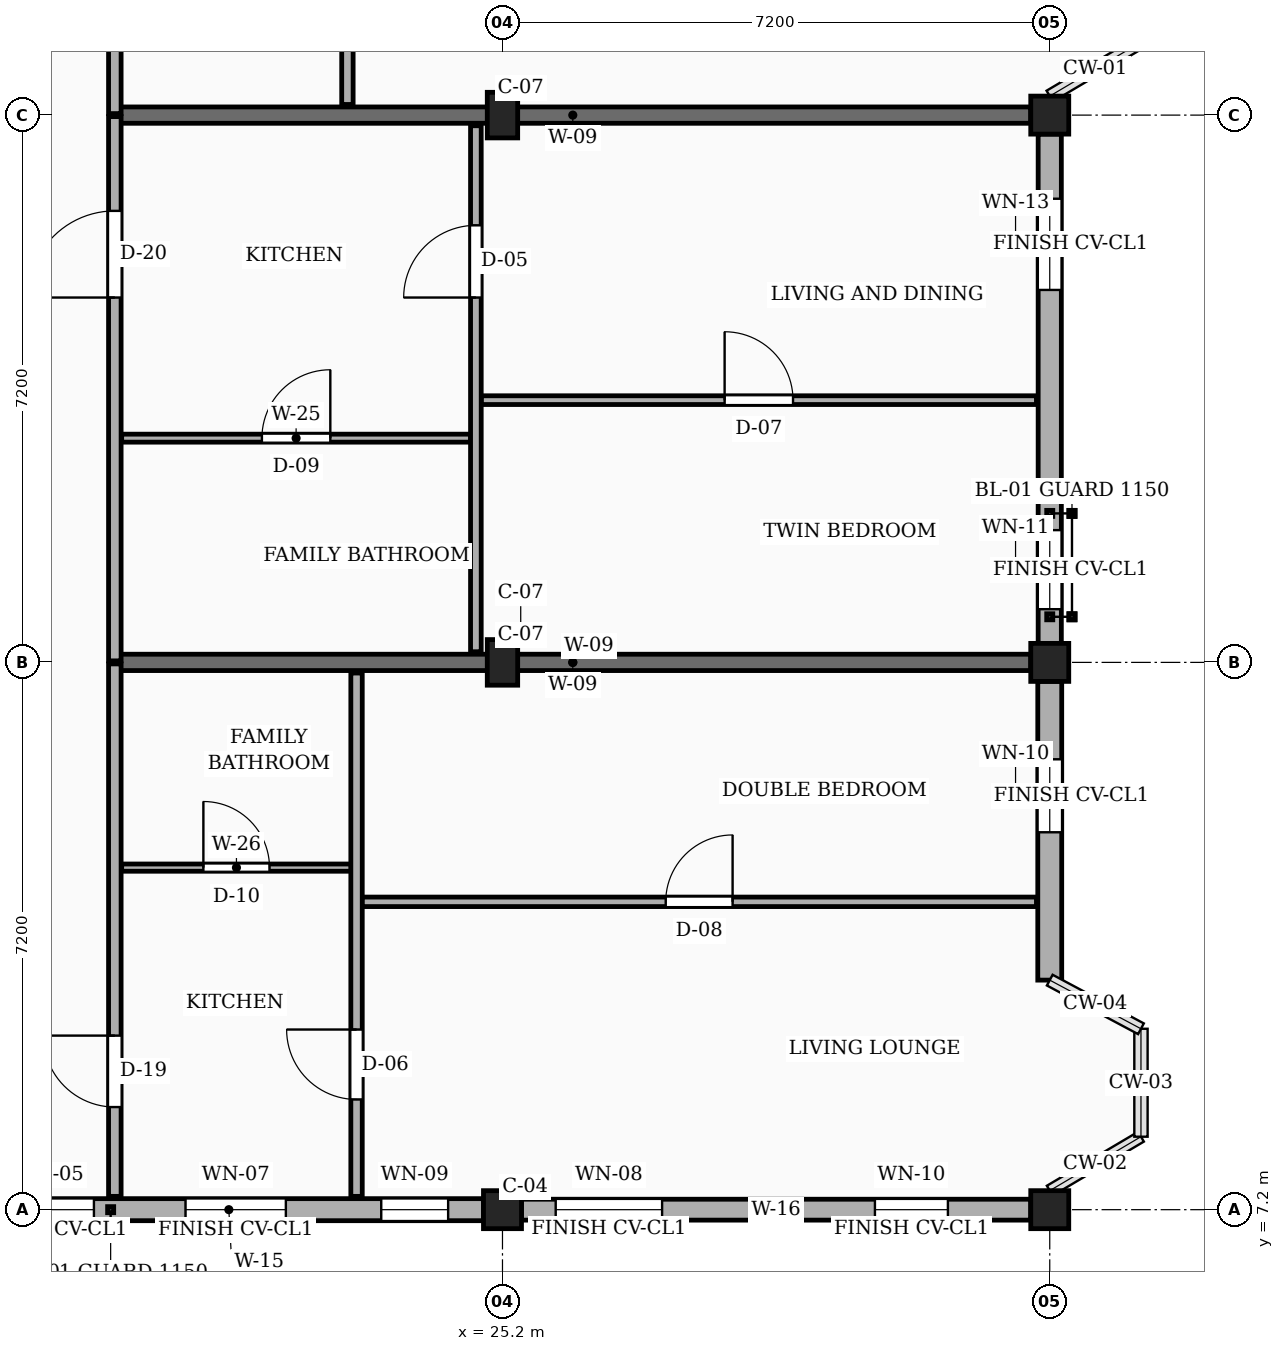
"""IFC4 building model, lengths in metres.
Left out: names, types, materials, properties, quantities, classifications, styles, units other than length and angle.
Written with IfcOpenShell. Run it as: python <this file> out.ifc"""

import sys

from ifc_helpers import new_model, si_unit, direction, frame, frame_2d, origin, origin_2d, place, context, subcontext, project, spatial, rectangle, extrude, element, fill, save


model = new_model("IFC4")
c1 = context("Model", 3, precision=1e-05, world=origin(), true_north=direction((0.0, 1.0)))
c2 = subcontext(c1, "Body", "Model", "MODEL_VIEW")
j1 = project(units=[si_unit("LENGTHUNIT", "METRE"), si_unit("PLANEANGLEUNIT", "RADIAN")], contexts=[c1])
p1 = place(None, origin())
s1 = spatial("IfcSite", under=j1, at=p1, CompositionType="ELEMENT")
p2 = place(p1, origin())
s2 = spatial("IfcBuilding", under=s1, at=p2, CompositionType="ELEMENT")
p3 = place(p2, frame((0.0, 0.0, 26.55)))
s3 = spatial("IfcBuildingStorey", under=s2, at=p3, CompositionType="ELEMENT", Elevation=26.55)
p4 = place(p3, frame((25.2, 7.2, 0.0), z_axis=(0.0, 0.0, 1.0), x_axis=(1.0, 0.0, 0.0)))
e1 = element("IfcColumn", 1, at=p4, inside=s3, PredefinedType="COLUMN", context=c2, shape_type="SweptSolid", body=[
    extrude(rectangle(XDim=0.5, YDim=0.5, at=origin_2d()), origin(), (0.0, 0.0, 1.0), 3.15),
])
for number, where, z_axis, x_axis in (
    (2, (25.2, 14.4, 0.0), (0.0, 0.0, 1.0), (1.0, 0.0, 0.0)),
    (3, (25.2, 21.6, 0.0), (0.0, 0.0, 1.0), (1.0, 0.0, 0.0)),
):
    element("IfcColumn", number, at=place(p3, frame(where, z_axis=z_axis, x_axis=x_axis)), inside=s3, PredefinedType="COLUMN", context=c2, shape_type="SweptSolid", body=[
        extrude(rectangle(XDim=0.4, YDim=0.6, at=origin_2d()), origin(), (0.0, 0.0, 1.0), 3.15),
    ])
for number, where, z_axis, x_axis in (
    (4, (32.4, 7.2, 0.0), (0.0, 0.0, 1.0), (1.0, 0.0, 0.0)),
    (5, (32.4, 14.4, 0.0), (0.0, 0.0, 1.0), (1.0, 0.0, 0.0)),
    (6, (32.4, 21.6, 0.0), (0.0, 0.0, 1.0), (1.0, 0.0, 0.0)),
):
    element("IfcColumn", number, at=place(p3, frame(where, z_axis=z_axis, x_axis=x_axis)), inside=s3, PredefinedType="COLUMN", context=c2, shape_type="SweptSolid", body=[
        extrude(rectangle(XDim=0.5, YDim=0.5, at=origin_2d()), origin(), (0.0, 0.0, 1.0), 3.15),
    ])
for number, where, z_axis, x_axis in (
    (7, (20.1, 14.4, 0.0), (0.0, 0.0, 1.0), (1.0, 0.0, 0.0)),
    (8, (20.1, 21.6, 0.0), (0.0, 0.0, 1.0), (1.0, 0.0, 0.0)),
):
    element("IfcWall", number, at=place(p3, frame(where, z_axis=z_axis, x_axis=x_axis)), inside=s3, PredefinedType="SOLIDWALL", context=c2, shape_type="SweptSolid", body=[
        extrude(rectangle(XDim=12.05, YDim=0.215, at=frame_2d((6.025, 0.0))), origin(), (0.0, 0.0, 1.0), 2.17),
    ])
p5 = place(p3, frame((18.25, 7.2, 0.0), z_axis=(0.0, 0.0, 1.0), x_axis=(1.0, 0.0, 0.0)))
e9 = element("IfcWall", 9, at=p5, inside=s3, PredefinedType="SOLIDWALL", context=c2, shape_type="SweptSolid", body=[
    extrude(rectangle(XDim=6.7, YDim=0.29, at=frame_2d((3.35, 0.0))), origin(), (0.0, 0.0, 1.0), 2.44),
])
p6 = place(p5, frame((0.415, 0.0, 0.78)))
e10 = element("IfcOpeningElement", 10, at=p6, cuts=e9, PredefinedType="OPENING", context=c2, shape_type="SweptSolid", body=[
    extrude(rectangle(XDim=1.16, YDim=1.15, at=frame_2d((0.58, 0.575))), frame((0.0, 0.155, 0.0), z_axis=(0.0, -1.0, 0.0), x_axis=(1.0, 0.0, 0.0)), (0.0, 0.0, 1.0), 0.31),
])
p7 = place(p5, frame((2.78, 0.0, 0.78)))
e11 = element("IfcOpeningElement", 11, at=p7, cuts=e9, PredefinedType="OPENING", context=c2, shape_type="SweptSolid", body=[
    extrude(rectangle(XDim=1.32, YDim=1.15, at=frame_2d((0.66, 0.575))), frame((0.0, 0.155, 0.0), z_axis=(0.0, -1.0, 0.0), x_axis=(1.0, 0.0, 0.0)), (0.0, 0.0, 1.0), 0.31),
])
p8 = place(p5, frame((5.355, 0.0, 0.78)))
e12 = element("IfcOpeningElement", 12, at=p8, cuts=e9, PredefinedType="OPENING", context=c2, shape_type="SweptSolid", body=[
    extrude(rectangle(XDim=0.88, YDim=1.26, at=frame_2d((0.44, 0.63))), frame((0.0, 0.155, 0.0), z_axis=(0.0, -1.0, 0.0), x_axis=(1.0, 0.0, 0.0)), (0.0, 0.0, 1.0), 0.31),
])
p9 = place(p3, frame((25.45, 7.2, 0.0), z_axis=(0.0, 0.0, 1.0), x_axis=(1.0, 0.0, 0.0)))
e13 = element("IfcWall", 13, at=p9, inside=s3, PredefinedType="SOLIDWALL", context=c2, shape_type="SweptSolid", body=[
    extrude(rectangle(XDim=6.7, YDim=0.275, at=frame_2d((3.35, 0.0))), origin(), (0.0, 0.0, 1.0), 2.44),
])
p10 = place(p9, frame((0.45, 0.0, 0.78)))
e14 = element("IfcOpeningElement", 14, at=p10, cuts=e13, PredefinedType="OPENING", context=c2, shape_type="SweptSolid", body=[
    extrude(rectangle(XDim=1.4, YDim=1.15, at=frame_2d((0.7, 0.575))), frame((0.0, 0.147, 0.0), z_axis=(0.0, -1.0, 0.0), x_axis=(1.0, 0.0, 0.0)), (0.0, 0.0, 1.0), 0.295),
])
p11 = place(p9, frame((4.65, 0.0, 0.78)))
e15 = element("IfcOpeningElement", 15, at=p11, cuts=e13, PredefinedType="OPENING", context=c2, shape_type="SweptSolid", body=[
    extrude(rectangle(XDim=0.96, YDim=1.26, at=frame_2d((0.48, 0.63))), frame((0.0, 0.147, 0.0), z_axis=(0.0, -1.0, 0.0), x_axis=(1.0, 0.0, 0.0)), (0.0, 0.0, 1.0), 0.295),
])
p12 = place(p3, frame((32.4, 10.22, 0.0), z_axis=(0.0, 0.0, 1.0), x_axis=(0.0, 1.0, 0.0)))
e16 = element("IfcWall", 16, at=p12, inside=s3, PredefinedType="SOLIDWALL", context=c2, shape_type="SweptSolid", body=[
    extrude(rectangle(XDim=3.93, YDim=0.315, at=frame_2d((1.965, 0.0))), origin(), (0.0, 0.0, 1.0), 2.44),
])
p13 = place(p12, frame((1.945, 0.0, 0.78)))
e17 = element("IfcOpeningElement", 17, at=p13, cuts=e16, PredefinedType="OPENING", context=c2, shape_type="SweptSolid", body=[
    extrude(rectangle(XDim=0.96, YDim=1.26, at=frame_2d((0.48, 0.63))), frame((0.0, 0.167, 0.0), z_axis=(0.0, -1.0, 0.0), x_axis=(1.0, 0.0, 0.0)), (0.0, 0.0, 1.0), 0.335),
])
p14 = place(p3, frame((32.4, 14.65, 0.0), z_axis=(0.0, 0.0, 1.0), x_axis=(0.0, 1.0, 0.0)))
e18 = element("IfcWall", 18, at=p14, inside=s3, PredefinedType="SOLIDWALL", context=c2, shape_type="SweptSolid", body=[
    extrude(rectangle(XDim=6.7, YDim=0.305, at=frame_2d((3.35, 0.0))), origin(), (0.0, 0.0, 1.0), 2.44),
])
p15 = place(p14, frame((0.45, 0.0, 0.78)))
e19 = element("IfcOpeningElement", 19, at=p15, cuts=e18, PredefinedType="OPENING", context=c2, shape_type="SweptSolid", body=[
    extrude(rectangle(XDim=1.04, YDim=1.26, at=frame_2d((0.52, 0.63))), frame((0.0, 0.163, 0.0), z_axis=(0.0, -1.0, 0.0), x_axis=(1.0, 0.0, 0.0)), (0.0, 0.0, 1.0), 0.325),
])
p16 = place(p14, frame((4.65, 0.0, 0.78)))
e20 = element("IfcOpeningElement", 20, at=p16, cuts=e18, PredefinedType="OPENING", context=c2, shape_type="SweptSolid", body=[
    extrude(rectangle(XDim=1.2, YDim=1.26, at=frame_2d((0.6, 0.63))), frame((0.0, 0.163, 0.0), z_axis=(0.0, -1.0, 0.0), x_axis=(1.0, 0.0, 0.0)), (0.0, 0.0, 1.0), 0.325),
])
p17 = place(p3, frame((20.1, 7.375, 0.0), z_axis=(0.0, 0.0, 1.0), x_axis=(0.0, 1.0, 0.0)))
e21 = element("IfcWall", 21, at=p17, inside=s3, PredefinedType="PARTITIONING", context=c2, shape_type="SweptSolid", body=[
    extrude(rectangle(XDim=7.005, YDim=0.165, at=frame_2d((3.502, 0.0))), origin(), (0.0, 0.0, 1.0), 2.305),
])
p18 = place(p17, frame((1.175, 0.0, 0.0)))
e22 = element("IfcOpeningElement", 22, at=p18, cuts=e21, PredefinedType="OPENING", context=c2, shape_type="SweptSolid", body=[
    extrude(rectangle(XDim=0.94, YDim=2.12, at=frame_2d((0.47, 1.06))), frame((0.0, 0.093, 0.0), z_axis=(0.0, -1.0, 0.0), x_axis=(1.0, 0.0, 0.0)), (0.0, 0.0, 1.0), 0.185),
])
p19 = place(p3, frame((20.1, 14.42, 0.0), z_axis=(0.0, 0.0, 1.0), x_axis=(0.0, 1.0, 0.0)))
e23 = element("IfcWall", 23, at=p19, inside=s3, PredefinedType="PARTITIONING", context=c2, shape_type="SweptSolid", body=[
    extrude(rectangle(XDim=7.16, YDim=0.165, at=frame_2d((3.58, 0.0))), origin(), (0.0, 0.0, 1.0), 2.305),
])
p20 = place(p19, frame((4.78, 0.0, 0.0)))
e24 = element("IfcOpeningElement", 24, at=p20, cuts=e23, PredefinedType="OPENING", context=c2, shape_type="SweptSolid", body=[
    extrude(rectangle(XDim=1.14, YDim=2.18, at=frame_2d((0.57, 1.09))), frame((0.0, 0.093, 0.0), z_axis=(0.0, -1.0, 0.0), x_axis=(1.0, 0.0, 0.0)), (0.0, 0.0, 1.0), 0.185),
])
p21 = place(p3, frame((20.1, 21.62, 0.0), z_axis=(0.0, 0.0, 1.0), x_axis=(0.0, 1.0, 0.0)))
e25 = element("IfcWall", 25, at=p21, inside=s3, PredefinedType="PARTITIONING", context=c2, shape_type="SweptSolid", body=[
    extrude(rectangle(XDim=7.16, YDim=0.165, at=frame_2d((3.58, 0.0))), origin(), (0.0, 0.0, 1.0), 2.305),
])
p22 = place(p21, frame((1.33, 0.0, 0.0)))
e26 = element("IfcOpeningElement", 26, at=p22, cuts=e25, PredefinedType="OPENING", context=c2, shape_type="SweptSolid", body=[
    extrude(rectangle(XDim=1.0, YDim=2.15, at=frame_2d((0.5, 1.075))), frame((0.0, 0.093, 0.0), z_axis=(0.0, -1.0, 0.0), x_axis=(1.0, 0.0, 0.0)), (0.0, 0.0, 1.0), 0.185),
])
p23 = place(p3, frame((23.35, 11.25, 0.0), z_axis=(0.0, 0.0, 1.0), x_axis=(1.0, 0.0, 0.0)))
e27 = element("IfcWall", 27, at=p23, inside=s3, PredefinedType="PARTITIONING", context=c2, shape_type="SweptSolid", body=[
    extrude(rectangle(XDim=8.875, YDim=0.125, at=frame_2d((4.438, 0.0))), origin(), (0.0, 0.0, 1.0), 2.305),
])
p24 = place(p23, frame((3.998, 0.0, 0.0)))
e28 = element("IfcOpeningElement", 28, at=p24, cuts=e27, PredefinedType="OPENING", context=c2, shape_type="SweptSolid", body=[
    extrude(rectangle(XDim=0.88, YDim=2.08, at=frame_2d((0.44, 1.04))), frame((0.0, 0.073, 0.0), z_axis=(0.0, -1.0, 0.0), x_axis=(1.0, 0.0, 0.0)), (0.0, 0.0, 1.0), 0.145),
])
p25 = place(p3, frame((20.19, 11.7, 0.0), z_axis=(0.0, 0.0, 1.0), x_axis=(1.0, 0.0, 0.0)))
e29 = element("IfcWall", 29, at=p25, inside=s3, PredefinedType="PARTITIONING", context=c2, shape_type="SweptSolid", body=[
    extrude(rectangle(XDim=3.02, YDim=0.095, at=frame_2d((1.51, 0.0))), origin(), (0.0, 0.0, 1.0), 2.305),
])
p26 = place(p25, frame((1.075, 0.0, 0.0)))
e30 = element("IfcOpeningElement", 30, at=p26, cuts=e29, PredefinedType="OPENING", context=c2, shape_type="SweptSolid", body=[
    extrude(rectangle(XDim=0.87, YDim=2.05, at=frame_2d((0.435, 1.025))), frame((0.0, 0.058, 0.0), z_axis=(0.0, -1.0, 0.0), x_axis=(1.0, 0.0, 0.0)), (0.0, 0.0, 1.0), 0.115),
])
p27 = place(p3, frame((23.28, 7.375, 0.0), z_axis=(0.0, 0.0, 1.0), x_axis=(0.0, 1.0, 0.0)))
e31 = element("IfcWall", 31, at=p27, inside=s3, PredefinedType="PARTITIONING", context=c2, shape_type="SweptSolid", body=[
    extrude(rectangle(XDim=6.885, YDim=0.15, at=frame_2d((3.442, 0.0))), origin(), (0.0, 0.0, 1.0), 2.305),
])
p28 = place(p27, frame((1.275, 0.0, 0.0)))
e32 = element("IfcOpeningElement", 32, at=p28, cuts=e31, PredefinedType="OPENING", context=c2, shape_type="SweptSolid", body=[
    extrude(rectangle(XDim=0.92, YDim=2.1, at=frame_2d((0.46, 1.05))), frame((0.0, 0.085, 0.0), z_axis=(0.0, -1.0, 0.0), x_axis=(1.0, 0.0, 0.0)), (0.0, 0.0, 1.0), 0.17),
])
p29 = place(p3, frame((24.92, 17.85, 0.0), z_axis=(0.0, 0.0, 1.0), x_axis=(1.0, 0.0, 0.0)))
e33 = element("IfcWall", 33, at=p29, inside=s3, PredefinedType="PARTITIONING", context=c2, shape_type="SweptSolid", body=[
    extrude(rectangle(XDim=7.305, YDim=0.115, at=frame_2d((3.653, 0.0))), origin(), (0.0, 0.0, 1.0), 2.305),
])
p30 = place(p29, frame((3.202, 0.0, 0.0)))
e34 = element("IfcOpeningElement", 34, at=p30, cuts=e33, PredefinedType="OPENING", context=c2, shape_type="SweptSolid", body=[
    extrude(rectangle(XDim=0.9, YDim=2.1, at=frame_2d((0.45, 1.05))), frame((0.0, 0.067, 0.0), z_axis=(0.0, -1.0, 0.0), x_axis=(1.0, 0.0, 0.0)), (0.0, 0.0, 1.0), 0.135),
])
p31 = place(p3, frame((20.19, 17.35, 0.0), z_axis=(0.0, 0.0, 1.0), x_axis=(1.0, 0.0, 0.0)))
e35 = element("IfcWall", 35, at=p31, inside=s3, PredefinedType="PARTITIONING", context=c2, shape_type="SweptSolid", body=[
    extrude(rectangle(XDim=4.59, YDim=0.105, at=frame_2d((2.295, 0.0))), origin(), (0.0, 0.0, 1.0), 2.305),
])
p32 = place(p31, frame((1.845, 0.0, 0.0)))
e36 = element("IfcOpeningElement", 36, at=p32, cuts=e35, PredefinedType="OPENING", context=c2, shape_type="SweptSolid", body=[
    extrude(rectangle(XDim=0.9, YDim=2.05, at=frame_2d((0.45, 1.025))), frame((0.0, 0.062, 0.0), z_axis=(0.0, -1.0, 0.0), x_axis=(1.0, 0.0, 0.0)), (0.0, 0.0, 1.0), 0.125),
])
p33 = place(p3, frame((24.85, 14.54, 0.0), z_axis=(0.0, 0.0, 1.0), x_axis=(0.0, 1.0, 0.0)))
e37 = element("IfcWall", 37, at=p33, inside=s3, PredefinedType="PARTITIONING", context=c2, shape_type="SweptSolid", body=[
    extrude(rectangle(XDim=6.92, YDim=0.14, at=frame_2d((3.46, 0.0))), origin(), (0.0, 0.0, 1.0), 2.305),
])
p34 = place(p33, frame((4.66, 0.0, 0.0)))
e38 = element("IfcOpeningElement", 38, at=p34, cuts=e37, PredefinedType="OPENING", context=c2, shape_type="SweptSolid", body=[
    extrude(rectangle(XDim=0.95, YDim=2.1, at=frame_2d((0.475, 1.05))), frame((0.0, 0.08, 0.0), z_axis=(0.0, -1.0, 0.0), x_axis=(1.0, 0.0, 0.0)), (0.0, 0.0, 1.0), 0.16),
])
p35 = place(p3, frame((23.16, 21.74, 0.0), z_axis=(0.0, 0.0, 1.0), x_axis=(0.0, 1.0, 0.0)))
e39 = element("IfcWall", 39, at=p35, inside=s3, PredefinedType="PARTITIONING", context=c2, shape_type="SweptSolid", body=[
    extrude(rectangle(XDim=6.92, YDim=0.15, at=frame_2d((3.46, 0.0))), origin(), (0.0, 0.0, 1.0), 2.305),
])
p36 = place(p35, frame((1.31, 0.0, 0.0)))
e40 = element("IfcOpeningElement", 40, at=p36, cuts=e39, PredefinedType="OPENING", context=c2, shape_type="SweptSolid", body=[
    extrude(rectangle(XDim=0.92, YDim=2.1, at=frame_2d((0.46, 1.05))), frame((0.0, 0.085, 0.0), z_axis=(0.0, -1.0, 0.0), x_axis=(1.0, 0.0, 0.0)), (0.0, 0.0, 1.0), 0.17),
])
p37 = place(p6, origin())
e41 = element("IfcWindow", 41, at=p37, inside=s3, PartitioningType="SINGLE_PANEL", PredefinedType="WINDOW", context=c2, shape_type="SweptSolid", body=[
    extrude(rectangle(XDim=1.16, YDim=1.15, at=frame_2d((0.58, 0.575))), frame((0.0, 0.03, 0.0), z_axis=(0.0, -1.0, 0.0), x_axis=(1.0, 0.0, 0.0)), (0.0, 0.0, 1.0), 0.06),
])
fill(e10, e41)
p38 = place(p7, origin())
e42 = element("IfcWindow", 42, at=p38, inside=s3, PartitioningType="SINGLE_PANEL", PredefinedType="WINDOW", context=c2, shape_type="SweptSolid", body=[
    extrude(rectangle(XDim=1.32, YDim=1.15, at=frame_2d((0.66, 0.575))), frame((0.0, 0.03, 0.0), z_axis=(0.0, -1.0, 0.0), x_axis=(1.0, 0.0, 0.0)), (0.0, 0.0, 1.0), 0.06),
])
fill(e11, e42)
p39 = place(p8, origin())
e43 = element("IfcWindow", 43, at=p39, inside=s3, PartitioningType="SINGLE_PANEL", PredefinedType="WINDOW", context=c2, shape_type="SweptSolid", body=[
    extrude(rectangle(XDim=0.88, YDim=1.26, at=frame_2d((0.44, 0.63))), frame((0.0, 0.03, 0.0), z_axis=(0.0, -1.0, 0.0), x_axis=(1.0, 0.0, 0.0)), (0.0, 0.0, 1.0), 0.06),
])
fill(e12, e43)
p40 = place(p10, origin())
e44 = element("IfcWindow", 44, at=p40, inside=s3, PartitioningType="SINGLE_PANEL", PredefinedType="WINDOW", context=c2, shape_type="SweptSolid", body=[
    extrude(rectangle(XDim=1.4, YDim=1.15, at=frame_2d((0.7, 0.575))), frame((0.0, 0.03, 0.0), z_axis=(0.0, -1.0, 0.0), x_axis=(1.0, 0.0, 0.0)), (0.0, 0.0, 1.0), 0.06),
])
fill(e14, e44)
p41 = place(p11, origin())
e45 = element("IfcWindow", 45, at=p41, inside=s3, PartitioningType="SINGLE_PANEL", PredefinedType="WINDOW", context=c2, shape_type="SweptSolid", body=[
    extrude(rectangle(XDim=0.96, YDim=1.26, at=frame_2d((0.48, 0.63))), frame((0.0, 0.03, 0.0), z_axis=(0.0, -1.0, 0.0), x_axis=(1.0, 0.0, 0.0)), (0.0, 0.0, 1.0), 0.06),
])
fill(e15, e45)
p42 = place(p13, origin())
e46 = element("IfcWindow", 46, at=p42, inside=s3, PartitioningType="SINGLE_PANEL", PredefinedType="WINDOW", context=c2, shape_type="SweptSolid", body=[
    extrude(rectangle(XDim=0.96, YDim=1.26, at=frame_2d((0.48, 0.63))), frame((0.0, 0.03, 0.0), z_axis=(0.0, -1.0, 0.0), x_axis=(1.0, 0.0, 0.0)), (0.0, 0.0, 1.0), 0.06),
])
fill(e17, e46)
p43 = place(p15, origin())
e47 = element("IfcWindow", 47, at=p43, inside=s3, PartitioningType="SINGLE_PANEL", PredefinedType="WINDOW", context=c2, shape_type="SweptSolid", body=[
    extrude(rectangle(XDim=1.04, YDim=1.26, at=frame_2d((0.52, 0.63))), frame((0.0, 0.03, 0.0), z_axis=(0.0, -1.0, 0.0), x_axis=(1.0, 0.0, 0.0)), (0.0, 0.0, 1.0), 0.06),
])
fill(e19, e47)
p44 = place(p16, origin())
e48 = element("IfcWindow", 48, at=p44, inside=s3, PartitioningType="SINGLE_PANEL", PredefinedType="WINDOW", context=c2, shape_type="SweptSolid", body=[
    extrude(rectangle(XDim=1.2, YDim=1.26, at=frame_2d((0.6, 0.63))), frame((0.0, 0.03, 0.0), z_axis=(0.0, -1.0, 0.0), x_axis=(1.0, 0.0, 0.0)), (0.0, 0.0, 1.0), 0.06),
])
fill(e20, e48)
p45 = place(p18, origin())
e49 = element("IfcDoor", 49, at=p45, inside=s3, OperationType="SINGLE_SWING_RIGHT", PredefinedType="DOOR", context=c2, shape_type="SweptSolid", body=[
    extrude(rectangle(XDim=0.94, YDim=2.12, at=frame_2d((0.47, 1.06))), frame((0.0, 0.025, 0.0), z_axis=(0.0, -1.0, 0.0), x_axis=(1.0, 0.0, 0.0)), (0.0, 0.0, 1.0), 0.05),
])
fill(e22, e49)
p46 = place(p20, origin())
e50 = element("IfcDoor", 50, at=p46, inside=s3, OperationType="SINGLE_SWING_LEFT", PredefinedType="DOOR", context=c2, shape_type="SweptSolid", body=[
    extrude(rectangle(XDim=1.14, YDim=2.18, at=frame_2d((0.57, 1.09))), frame((0.0, 0.025, 0.0), z_axis=(0.0, -1.0, 0.0), x_axis=(1.0, 0.0, 0.0)), (0.0, 0.0, 1.0), 0.05),
])
fill(e24, e50)
p47 = place(p24, origin())
e51 = element("IfcDoor", 51, at=p47, inside=s3, OperationType="SINGLE_SWING_RIGHT", PredefinedType="DOOR", context=c2, shape_type="SweptSolid", body=[
    extrude(rectangle(XDim=0.88, YDim=2.08, at=frame_2d((0.44, 1.04))), frame((0.0, 0.025, 0.0), z_axis=(0.0, -1.0, 0.0), x_axis=(1.0, 0.0, 0.0)), (0.0, 0.0, 1.0), 0.05),
])
fill(e28, e51)
p48 = place(p26, origin())
e52 = element("IfcDoor", 52, at=p48, inside=s3, OperationType="SINGLE_SWING_LEFT", PredefinedType="DOOR", context=c2, shape_type="SweptSolid", body=[
    extrude(rectangle(XDim=0.87, YDim=2.05, at=frame_2d((0.435, 1.025))), frame((0.0, 0.025, 0.0), z_axis=(0.0, -1.0, 0.0), x_axis=(1.0, 0.0, 0.0)), (0.0, 0.0, 1.0), 0.05),
])
fill(e30, e52)
p49 = place(p28, origin())
e53 = element("IfcDoor", 53, at=p49, inside=s3, OperationType="SINGLE_SWING_RIGHT", PredefinedType="DOOR", context=c2, shape_type="SweptSolid", body=[
    extrude(rectangle(XDim=0.92, YDim=2.1, at=frame_2d((0.46, 1.05))), frame((0.0, 0.025, 0.0), z_axis=(0.0, -1.0, 0.0), x_axis=(1.0, 0.0, 0.0)), (0.0, 0.0, 1.0), 0.05),
])
fill(e32, e53)
p50 = place(p30, origin())
e54 = element("IfcDoor", 54, at=p50, inside=s3, OperationType="SINGLE_SWING_LEFT", PredefinedType="DOOR", context=c2, shape_type="SweptSolid", body=[
    extrude(rectangle(XDim=0.9, YDim=2.1, at=frame_2d((0.45, 1.05))), frame((0.0, 0.025, 0.0), z_axis=(0.0, -1.0, 0.0), x_axis=(1.0, 0.0, 0.0)), (0.0, 0.0, 1.0), 0.05),
])
fill(e34, e54)
p51 = place(p32, origin())
e55 = element("IfcDoor", 55, at=p51, inside=s3, OperationType="SINGLE_SWING_RIGHT", PredefinedType="DOOR", context=c2, shape_type="SweptSolid", body=[
    extrude(rectangle(XDim=0.9, YDim=2.05, at=frame_2d((0.45, 1.025))), frame((0.0, 0.025, 0.0), z_axis=(0.0, -1.0, 0.0), x_axis=(1.0, 0.0, 0.0)), (0.0, 0.0, 1.0), 0.05),
])
fill(e36, e55)
p52 = place(p34, origin())
e56 = element("IfcDoor", 56, at=p52, inside=s3, OperationType="SINGLE_SWING_LEFT", PredefinedType="DOOR", context=c2, shape_type="SweptSolid", body=[
    extrude(rectangle(XDim=0.95, YDim=2.1, at=frame_2d((0.475, 1.05))), frame((0.0, 0.025, 0.0), z_axis=(0.0, -1.0, 0.0), x_axis=(1.0, 0.0, 0.0)), (0.0, 0.0, 1.0), 0.05),
])
fill(e38, e56)
save(model, sys.argv[1])
